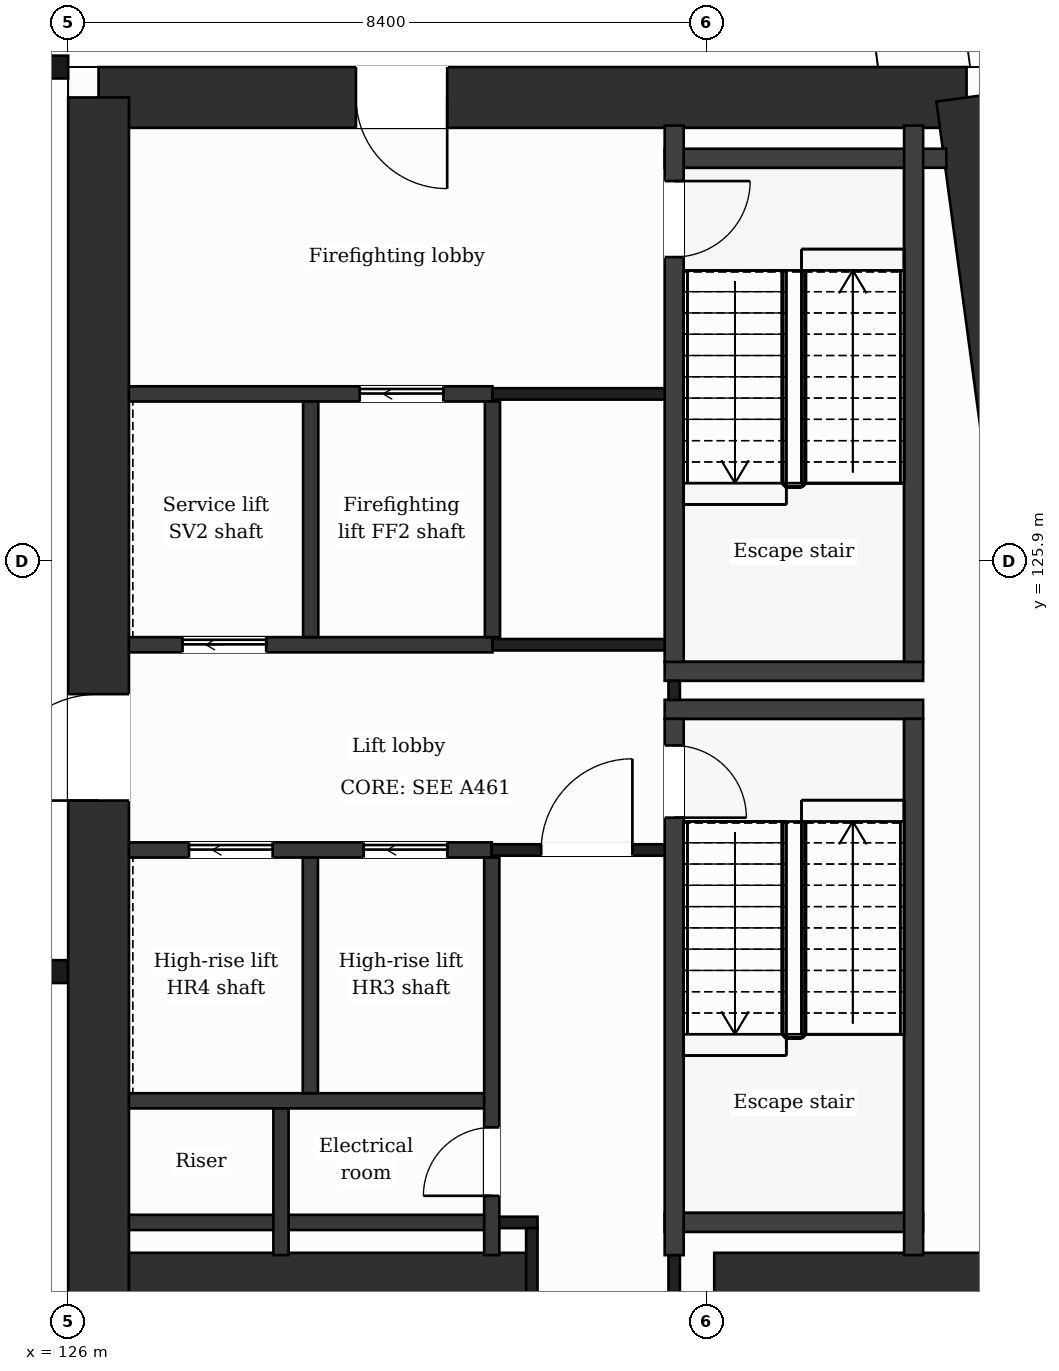
"""IFC4 building model, lengths in metres.
Left out: names, types, materials, properties, quantities, classifications, styles, units other than length and angle.
Written with IfcOpenShell. Run it as: python <this file> out.ifc"""

import sys

from ifc_helpers import new_model, si_unit, direction, frame, frame_2d, origin, place, context, subcontext, project, spatial, rectangle, extrude, element, fill, save


model = new_model("IFC4")
c1 = context("Model", 3, precision=1e-05, world=origin(), true_north=direction((0.0, 1.0)))
c2 = subcontext(c1, "Body", "Model", "MODEL_VIEW")
j1 = project(units=[si_unit("LENGTHUNIT", "METRE"), si_unit("PLANEANGLEUNIT", "RADIAN")], contexts=[c1])
p1 = place(None, origin())
s1 = spatial("IfcSite", under=j1, at=p1, CompositionType="ELEMENT")
p2 = place(p1, origin())
s2 = spatial("IfcBuilding", under=s1, at=p2, CompositionType="ELEMENT")
p3 = place(p2, frame((0.0, 0.0, 246.6)))
s3 = spatial("IfcBuildingStorey", under=s2, at=p3, CompositionType="ELEMENT", Elevation=246.6)
p4 = place(p3, frame((126.4, 132.0, 0.0), z_axis=(0.0, 0.0, 1.0), x_axis=(1.0, 0.0, 0.0)))
e1 = element("IfcWall", 1, at=p4, inside=s3, PredefinedType="SHEAR", context=c2, shape_type="SweptSolid", body=[
    extrude(rectangle(XDim=11.42, YDim=0.8, at=frame_2d((5.71, 0.0))), origin(), (0.0, 0.0, 1.0), 7.4),
])
p5 = place(p4, frame((3.386, 0.0, 0.0)))
e2 = element("IfcOpeningElement", 2, at=p5, cuts=e1, PredefinedType="OPENING", context=c2, shape_type="SweptSolid", body=[
    extrude(rectangle(XDim=1.2, YDim=2.1, at=frame_2d((0.6, 1.05))), frame((0.0, 0.41, 0.0), z_axis=(0.0, -1.0, 0.0), x_axis=(1.0, 0.0, 0.0)), (0.0, 0.0, 1.0), 0.82),
])
p6 = place(p3, frame((137.82, 132.0, 0.0), z_axis=(0.0, 0.0, 1.0), x_axis=(0.133408347329, -0.991061154956, 0.0)))
e3 = element("IfcWall", 3, at=p6, inside=s3, PredefinedType="SHEAR", context=c2, shape_type="SweptSolid", body=[
    extrude(rectangle(XDim=21.391, YDim=0.8, at=frame_2d((10.696, 0.0))), origin(), (0.0, 0.0, 1.0), 7.4),
])
p7 = place(p3, frame((126.4, 110.8, 0.0), z_axis=(0.0, 0.0, 1.0), x_axis=(0.0, 1.0, 0.0)))
e4 = element("IfcWall", 4, at=p7, inside=s3, PredefinedType="SHEAR", context=c2, shape_type="SweptSolid", body=[
    extrude(rectangle(XDim=21.2, YDim=0.8, at=frame_2d((10.6, 0.0))), origin(), (0.0, 0.0, 1.0), 7.4),
])
p8 = place(p7, frame((11.95, 0.0, 0.0)))
e5 = element("IfcOpeningElement", 5, at=p8, cuts=e4, PredefinedType="OPENING", context=c2, shape_type="SweptSolid", body=[
    extrude(rectangle(XDim=1.4, YDim=2.1, at=frame_2d((0.7, 1.05))), frame((0.0, 0.41, 0.0), z_axis=(0.0, -1.0, 0.0), x_axis=(1.0, 0.0, 0.0)), (0.0, 0.0, 1.0), 0.82),
])
p9 = place(p3, frame((126.8, 116.4, 0.0), z_axis=(0.0, 0.0, 1.0), x_axis=(1.0, 0.0, 0.0)))
e6 = element("IfcWall", 6, at=p9, inside=s3, PredefinedType="SHEAR", context=c2, shape_type="SweptSolid", body=[
    extrude(rectangle(XDim=5.3, YDim=0.8, at=frame_2d((2.65, 0.0))), origin(), (0.0, 0.0, 1.0), 7.4),
])
p10 = place(p3, frame((134.5, 116.4, 0.0), z_axis=(0.0, 0.0, 1.0), x_axis=(1.0, 0.0, 0.0)))
e7 = element("IfcWall", 7, at=p10, inside=s3, PredefinedType="SHEAR", context=c2, shape_type="SweptSolid", body=[
    extrude(rectangle(XDim=5.077, YDim=0.8, at=frame_2d((2.539, 0.0))), origin(), (0.0, 0.0, 1.0), 7.4),
])
p11 = place(p3, frame((126.8, 117.2, 0.0), z_axis=(0.0, 0.0, 1.0), x_axis=(1.0, 0.0, 0.0)))
e8 = element("IfcWall", 8, at=p11, inside=s3, PredefinedType="PARTITIONING", context=c2, shape_type="SweptSolid", body=[
    extrude(rectangle(XDim=4.773, YDim=0.2, at=frame_2d((2.386, 0.0))), origin(), (0.0, 0.0, 1.0), 6.9),
])
p12 = place(p3, frame((131.573, 117.2, 0.0), z_axis=(0.0, 0.0, 1.0), x_axis=(1.0, 0.0, 0.0)))
e9 = element("IfcWall", 9, at=p12, inside=s3, PredefinedType="PARTITIONING", context=c2, shape_type="SweptSolid", body=[
    extrude(rectangle(XDim=0.602, YDim=0.15, at=frame_2d((0.301, 0.0))), origin(), (0.0, 0.0, 1.0), 6.9),
])
p13 = place(p3, frame((133.848, 117.2, 0.0), z_axis=(0.0, 0.0, 1.0), x_axis=(1.0, 0.0, 0.0)))
e10 = element("IfcWall", 10, at=p13, inside=s3, PredefinedType="PARTITIONING", context=c2, shape_type="SweptSolid", body=[
    extrude(rectangle(XDim=3.4, YDim=0.25, at=frame_2d((1.7, 0.0))), origin(), (0.0, 0.0, 1.0), 6.9),
])
p14 = place(p3, frame((126.8, 118.8, 0.0), z_axis=(0.0, 0.0, 1.0), x_axis=(1.0, 0.0, 0.0)))
e11 = element("IfcWall", 11, at=p14, inside=s3, PredefinedType="PARTITIONING", context=c2, shape_type="SweptSolid", body=[
    extrude(rectangle(XDim=4.773, YDim=0.2, at=frame_2d((2.386, 0.0))), origin(), (0.0, 0.0, 1.0), 6.9),
])
p15 = place(p3, frame((100.8, 120.5, 0.0), z_axis=(0.0, 0.0, 1.0), x_axis=(1.0, 0.0, 0.0)))
e12 = element("IfcWall", 12, at=p15, inside=s3, PredefinedType="PARTITIONING", context=c2, shape_type="SweptSolid", body=[
    extrude(rectangle(XDim=25.2, YDim=0.3, at=frame_2d((12.6, 0.0))), origin(), (0.0, 0.0, 1.0), 1.0),
])
p16 = place(p3, frame((126.8, 122.1, 0.0), z_axis=(0.0, 0.0, 1.0), x_axis=(1.0, 0.0, 0.0)))
e13 = element("IfcWall", 13, at=p16, inside=s3, PredefinedType="PARTITIONING", context=c2, shape_type="SweptSolid", body=[
    extrude(rectangle(XDim=4.773, YDim=0.2, at=frame_2d((2.386, 0.0))), origin(), (0.0, 0.0, 1.0), 6.9),
])
p17 = place(p16, frame((3.088, 0.0, 0.0)))
e14 = element("IfcOpeningElement", 14, at=p17, cuts=e13, PredefinedType="OPENING", context=c2, shape_type="SweptSolid", body=[
    extrude(rectangle(XDim=1.1, YDim=2.1, at=frame_2d((0.55, 1.05))), frame((0.0, 0.11, 0.0), z_axis=(0.0, -1.0, 0.0), x_axis=(1.0, 0.0, 0.0)), (0.0, 0.0, 1.0), 0.22),
])
p18 = place(p16, frame((0.79, 0.0, 0.0)))
e15 = element("IfcOpeningElement", 15, at=p18, cuts=e13, PredefinedType="OPENING", context=c2, shape_type="SweptSolid", body=[
    extrude(rectangle(XDim=1.1, YDim=2.1, at=frame_2d((0.55, 1.05))), frame((0.0, 0.11, 0.0), z_axis=(0.0, -1.0, 0.0), x_axis=(1.0, 0.0, 0.0)), (0.0, 0.0, 1.0), 0.22),
])
p19 = place(p3, frame((131.573, 122.1, 0.0), z_axis=(0.0, 0.0, 1.0), x_axis=(1.0, 0.0, 0.0)))
e16 = element("IfcWall", 16, at=p19, inside=s3, PredefinedType="PARTITIONING", context=c2, shape_type="SweptSolid", body=[
    extrude(rectangle(XDim=2.4, YDim=0.15, at=frame_2d((1.2, 0.0))), origin(), (0.0, 0.0, 1.0), 6.9),
])
p20 = place(p19, frame((0.65, 0.0, 0.0)))
e17 = element("IfcOpeningElement", 17, at=p20, cuts=e16, PredefinedType="OPENING", context=c2, shape_type="SweptSolid", body=[
    extrude(rectangle(XDim=1.2, YDim=2.1, at=frame_2d((0.6, 1.05))), frame((0.0, 0.085, 0.0), z_axis=(0.0, -1.0, 0.0), x_axis=(1.0, 0.0, 0.0)), (0.0, 0.0, 1.0), 0.17),
])
for number, where, z_axis, x_axis in (
    (18, (133.848, 123.95, 0.0), (0.0, 0.0, 1.0), (1.0, 0.0, 0.0)),
    (19, (133.848, 124.45, 0.0), (0.0, 0.0, 1.0), (1.0, 0.0, 0.0)),
):
    element("IfcWall", number, at=place(p3, frame(where, z_axis=z_axis, x_axis=x_axis)), inside=s3, PredefinedType="PARTITIONING", context=c2, shape_type="SweptSolid", body=[
        extrude(rectangle(XDim=3.4, YDim=0.25, at=frame_2d((1.7, 0.0))), origin(), (0.0, 0.0, 1.0), 6.9),
    ])
p21 = place(p3, frame((126.8, 124.8, 0.0), z_axis=(0.0, 0.0, 1.0), x_axis=(1.0, 0.0, 0.0)))
e20 = element("IfcWall", 20, at=p21, inside=s3, PredefinedType="PARTITIONING", context=c2, shape_type="SweptSolid", body=[
    extrude(rectangle(XDim=4.782, YDim=0.2, at=frame_2d((2.391, 0.0))), origin(), (0.0, 0.0, 1.0), 6.9),
])
p22 = place(p21, frame((0.705, 0.0, 0.0)))
e21 = element("IfcOpeningElement", 21, at=p22, cuts=e20, PredefinedType="OPENING", context=c2, shape_type="SweptSolid", body=[
    extrude(rectangle(XDim=1.1, YDim=2.1, at=frame_2d((0.55, 1.05))), frame((0.0, 0.11, 0.0), z_axis=(0.0, -1.0, 0.0), x_axis=(1.0, 0.0, 0.0)), (0.0, 0.0, 1.0), 0.22),
])
p23 = place(p3, frame((131.582, 124.8, 0.0), z_axis=(0.0, 0.0, 1.0), x_axis=(1.0, 0.0, 0.0)))
e22 = element("IfcWall", 22, at=p23, inside=s3, PredefinedType="PARTITIONING", context=c2, shape_type="SweptSolid", body=[
    extrude(rectangle(XDim=2.516, YDim=0.15, at=frame_2d((1.258, 0.0))), origin(), (0.0, 0.0, 1.0), 6.9),
])
p24 = place(p3, frame((126.8, 128.1, 0.0), z_axis=(0.0, 0.0, 1.0), x_axis=(1.0, 0.0, 0.0)))
e23 = element("IfcWall", 23, at=p24, inside=s3, PredefinedType="PARTITIONING", context=c2, shape_type="SweptSolid", body=[
    extrude(rectangle(XDim=4.782, YDim=0.2, at=frame_2d((2.391, 0.0))), origin(), (0.0, 0.0, 1.0), 6.9),
])
p25 = place(p24, frame((3.036, 0.0, 0.0)))
e24 = element("IfcOpeningElement", 24, at=p25, cuts=e23, PredefinedType="OPENING", context=c2, shape_type="SweptSolid", body=[
    extrude(rectangle(XDim=1.1, YDim=2.1, at=frame_2d((0.55, 1.05))), frame((0.0, 0.11, 0.0), z_axis=(0.0, -1.0, 0.0), x_axis=(1.0, 0.0, 0.0)), (0.0, 0.0, 1.0), 0.22),
])
p26 = place(p3, frame((131.582, 128.1, 0.0), z_axis=(0.0, 0.0, 1.0), x_axis=(1.0, 0.0, 0.0)))
e25 = element("IfcWall", 25, at=p26, inside=s3, PredefinedType="PARTITIONING", context=c2, shape_type="SweptSolid", body=[
    extrude(rectangle(XDim=2.391, YDim=0.15, at=frame_2d((1.195, 0.0))), origin(), (0.0, 0.0, 1.0), 6.9),
])
p27 = place(p3, frame((133.848, 131.2, 0.0), z_axis=(0.0, 0.0, 1.0), x_axis=(1.0, 0.0, 0.0)))
e26 = element("IfcWall", 26, at=p27, inside=s3, PredefinedType="PARTITIONING", context=c2, shape_type="SweptSolid", body=[
    extrude(rectangle(XDim=3.706, YDim=0.25, at=frame_2d((1.853, 0.0))), origin(), (0.0, 0.0, 1.0), 6.9),
])
p28 = place(p3, frame((124.4, 132.4, 0.0), z_axis=(0.0, 0.0, 1.0), x_axis=(1.0, 0.0, 0.0)))
e27 = element("IfcWall", 27, at=p28, inside=s3, PredefinedType="PARTITIONING", context=c2, shape_type="SweptSolid", body=[
    extrude(rectangle(XDim=1.6, YDim=0.3, at=frame_2d((0.8, 0.0))), origin(), (0.0, 0.0, 1.0), 1.0),
])
p29 = place(p3, frame((128.8, 116.77, 0.0), z_axis=(0.0, 0.0, 1.0), x_axis=(0.0, 1.0, 0.0)))
e28 = element("IfcWall", 28, at=p29, inside=s3, PredefinedType="PARTITIONING", context=c2, shape_type="SweptSolid", body=[
    extrude(rectangle(XDim=1.93, YDim=0.2, at=frame_2d((0.965, 0.0))), origin(), (0.0, 0.0, 1.0), 6.9),
])
for number, where, z_axis, x_axis in (
    (29, (129.187, 118.9, 0.0), (0.0, 0.0, 1.0), (0.0, 1.0, 0.0)),
    (30, (129.191, 124.9, 0.0), (0.0, 0.0, 1.0), (0.0, 1.0, 0.0)),
):
    element("IfcWall", number, at=place(p3, frame(where, z_axis=z_axis, x_axis=x_axis)), inside=s3, PredefinedType="PARTITIONING", context=c2, shape_type="SweptSolid", body=[
        extrude(rectangle(XDim=3.1, YDim=0.2, at=frame_2d((1.55, 0.0))), origin(), (0.0, 0.0, 1.0), 6.9),
    ])
p30 = place(p3, frame((131.573, 116.77, 0.0), z_axis=(0.0, 0.0, 1.0), x_axis=(0.0, 1.0, 0.0)))
e31 = element("IfcWall", 31, at=p30, inside=s3, PredefinedType="PARTITIONING", context=c2, shape_type="SweptSolid", body=[
    extrude(rectangle(XDim=5.23, YDim=0.2, at=frame_2d((2.615, 0.0))), origin(), (0.0, 0.0, 1.0), 6.9),
])
p31 = place(p30, frame((0.78, 0.0, 0.0)))
e32 = element("IfcOpeningElement", 32, at=p31, cuts=e31, PredefinedType="OPENING", context=c2, shape_type="SweptSolid", body=[
    extrude(rectangle(XDim=0.9, YDim=2.1, at=frame_2d((0.45, 1.05))), frame((0.0, 0.11, 0.0), z_axis=(0.0, -1.0, 0.0), x_axis=(1.0, 0.0, 0.0)), (0.0, 0.0, 1.0), 0.22),
])
p32 = place(p3, frame((131.582, 124.9, 0.0), z_axis=(0.0, 0.0, 1.0), x_axis=(0.0, 1.0, 0.0)))
e33 = element("IfcWall", 33, at=p32, inside=s3, PredefinedType="PARTITIONING", context=c2, shape_type="SweptSolid", body=[
    extrude(rectangle(XDim=3.1, YDim=0.2, at=frame_2d((1.55, 0.0))), origin(), (0.0, 0.0, 1.0), 6.9),
])
p33 = place(p3, frame((132.1, 116.0, 0.0), z_axis=(0.0, 0.0, 1.0), x_axis=(0.0, 1.0, 0.0)))
e34 = element("IfcWall", 34, at=p33, inside=s3, PredefinedType="PARTITIONING", context=c2, shape_type="SweptSolid", body=[
    extrude(rectangle(XDim=1.125, YDim=0.15, at=frame_2d((0.562, 0.0))), origin(), (0.0, 0.0, 1.0), 6.9),
])
p34 = place(p3, frame((133.973, 116.0, 0.0), z_axis=(0.0, 0.0, 1.0), x_axis=(0.0, 1.0, 0.0)))
e35 = element("IfcWall", 35, at=p34, inside=s3, PredefinedType="PARTITIONING", context=c2, shape_type="SweptSolid", body=[
    extrude(rectangle(XDim=0.77, YDim=0.15, at=frame_2d((0.385, 0.0))), origin(), (0.0, 0.0, 1.0), 6.9),
])
p35 = place(p3, frame((133.973, 124.075, 0.0), z_axis=(0.0, 0.0, 1.0), x_axis=(0.0, 1.0, 0.0)))
e36 = element("IfcWall", 36, at=p35, inside=s3, PredefinedType="PARTITIONING", context=c2, shape_type="SweptSolid", body=[
    extrude(rectangle(XDim=0.25, YDim=0.15, at=frame_2d((0.125, 0.0))), origin(), (0.0, 0.0, 1.0), 6.9),
])
p36 = place(p3, frame((133.973, 116.77, 0.0), z_axis=(0.0, 0.0, 1.0), x_axis=(0.0, 1.0, 0.0)))
e37 = element("IfcWall", 37, at=p36, inside=s3, PredefinedType="PARTITIONING", context=c2, shape_type="SweptSolid", body=[
    extrude(rectangle(XDim=7.055, YDim=0.25, at=frame_2d((3.527, 0.0))), origin(), (0.0, 0.0, 1.0), 6.9),
])
p37 = place(p36, frame((5.755, 0.0, 0.0)))
e38 = element("IfcOpeningElement", 38, at=p37, cuts=e37, PredefinedType="OPENING", context=c2, shape_type="SweptSolid", body=[
    extrude(rectangle(XDim=0.95, YDim=2.1, at=frame_2d((0.475, 1.05))), frame((0.0, 0.135, 0.0), z_axis=(0.0, -1.0, 0.0), x_axis=(1.0, 0.0, 0.0)), (0.0, 0.0, 1.0), 0.27),
])
p38 = place(p3, frame((133.973, 124.575, 0.0), z_axis=(0.0, 0.0, 1.0), x_axis=(0.0, 1.0, 0.0)))
e39 = element("IfcWall", 39, at=p38, inside=s3, PredefinedType="PARTITIONING", context=c2, shape_type="SweptSolid", body=[
    extrude(rectangle(XDim=7.055, YDim=0.25, at=frame_2d((3.527, 0.0))), origin(), (0.0, 0.0, 1.0), 6.9),
])
p39 = place(p38, frame((5.325, 0.0, 0.0)))
e40 = element("IfcOpeningElement", 40, at=p39, cuts=e39, PredefinedType="OPENING", context=c2, shape_type="SweptSolid", body=[
    extrude(rectangle(XDim=1.0, YDim=2.1, at=frame_2d((0.5, 1.05))), frame((0.0, 0.135, 0.0), z_axis=(0.0, -1.0, 0.0), x_axis=(1.0, 0.0, 0.0)), (0.0, 0.0, 1.0), 0.27),
])
for number, where, z_axis, x_axis in (
    (41, (137.123, 116.77, 0.0), (0.0, 0.0, 1.0), (0.0, 1.0, 0.0)),
    (42, (137.123, 124.575, 0.0), (0.0, 0.0, 1.0), (0.0, 1.0, 0.0)),
):
    element("IfcWall", number, at=place(p3, frame(where, z_axis=z_axis, x_axis=x_axis)), inside=s3, PredefinedType="PARTITIONING", context=c2, shape_type="SweptSolid", body=[
        extrude(rectangle(XDim=7.055, YDim=0.25, at=frame_2d((3.527, 0.0))), origin(), (0.0, 0.0, 1.0), 6.9),
    ])
p40 = place(p20, origin())
e43 = element("IfcDoor", 43, at=p40, inside=s3, OperationType="SINGLE_SWING_RIGHT", PredefinedType="DOOR", context=c2, shape_type="SweptSolid", body=[
    extrude(rectangle(XDim=1.2, YDim=2.1, at=frame_2d((0.6, 1.05))), frame((0.0, 0.025, 0.0), z_axis=(0.0, -1.0, 0.0), x_axis=(1.0, 0.0, 0.0)), (0.0, 0.0, 1.0), 0.05),
])
fill(e17, e43)
p41 = place(p17, origin())
e44 = element("IfcDoor", 44, at=p41, inside=s3, OperationType="SLIDING_TO_LEFT", PredefinedType="DOOR", context=c2, shape_type="SweptSolid", body=[
    extrude(rectangle(XDim=1.1, YDim=2.1, at=frame_2d((0.55, 1.05))), frame((0.0, 0.025, 0.0), z_axis=(0.0, -1.0, 0.0), x_axis=(1.0, 0.0, 0.0)), (0.0, 0.0, 1.0), 0.05),
])
fill(e14, e44)
p42 = place(p18, origin())
e45 = element("IfcDoor", 45, at=p42, inside=s3, OperationType="SLIDING_TO_LEFT", PredefinedType="DOOR", context=c2, shape_type="SweptSolid", body=[
    extrude(rectangle(XDim=1.1, YDim=2.1, at=frame_2d((0.55, 1.05))), frame((0.0, 0.025, 0.0), z_axis=(0.0, -1.0, 0.0), x_axis=(1.0, 0.0, 0.0)), (0.0, 0.0, 1.0), 0.05),
])
fill(e15, e45)
p43 = place(p25, origin())
e46 = element("IfcDoor", 46, at=p43, inside=s3, OperationType="SLIDING_TO_LEFT", PredefinedType="DOOR", context=c2, shape_type="SweptSolid", body=[
    extrude(rectangle(XDim=1.1, YDim=2.1, at=frame_2d((0.55, 1.05))), frame((0.0, 0.025, 0.0), z_axis=(0.0, -1.0, 0.0), x_axis=(1.0, 0.0, 0.0)), (0.0, 0.0, 1.0), 0.05),
])
fill(e24, e46)
p44 = place(p22, origin())
e47 = element("IfcDoor", 47, at=p44, inside=s3, OperationType="SLIDING_TO_LEFT", PredefinedType="DOOR", context=c2, shape_type="SweptSolid", body=[
    extrude(rectangle(XDim=1.1, YDim=2.1, at=frame_2d((0.55, 1.05))), frame((0.0, 0.025, 0.0), z_axis=(0.0, -1.0, 0.0), x_axis=(1.0, 0.0, 0.0)), (0.0, 0.0, 1.0), 0.05),
])
fill(e21, e47)
p45 = place(p37, origin())
e48 = element("IfcDoor", 48, at=p45, inside=s3, OperationType="SINGLE_SWING_LEFT", PredefinedType="DOOR", context=c2, shape_type="SweptSolid", body=[
    extrude(rectangle(XDim=0.95, YDim=2.1, at=frame_2d((0.475, 1.05))), frame((0.0, 0.025, 0.0), z_axis=(0.0, -1.0, 0.0), x_axis=(1.0, 0.0, 0.0)), (0.0, 0.0, 1.0), 0.05),
])
fill(e38, e48)
p46 = place(p39, origin())
e49 = element("IfcDoor", 49, at=p46, inside=s3, OperationType="SINGLE_SWING_RIGHT", PredefinedType="DOOR", context=c2, shape_type="SweptSolid", body=[
    extrude(rectangle(XDim=1.0, YDim=2.1, at=frame_2d((0.5, 1.05))), frame((0.0, 0.025, 0.0), z_axis=(0.0, -1.0, 0.0), x_axis=(1.0, 0.0, 0.0)), (0.0, 0.0, 1.0), 0.05),
])
fill(e40, e49)
p47 = place(p31, origin())
e50 = element("IfcDoor", 50, at=p47, inside=s3, OperationType="SINGLE_SWING_LEFT", PredefinedType="DOOR", context=c2, shape_type="SweptSolid", body=[
    extrude(rectangle(XDim=0.9, YDim=2.1, at=frame_2d((0.45, 1.05))), frame((0.0, 0.025, 0.0), z_axis=(0.0, -1.0, 0.0), x_axis=(1.0, 0.0, 0.0)), (0.0, 0.0, 1.0), 0.05),
])
fill(e32, e50)
p48 = place(p5, origin())
e51 = element("IfcDoor", 51, at=p48, inside=s3, OperationType="SINGLE_SWING_RIGHT", PredefinedType="DOOR", context=c2, shape_type="SweptSolid", body=[
    extrude(rectangle(XDim=1.2, YDim=2.1, at=frame_2d((0.6, 1.05))), frame((0.0, 0.025, 0.0), z_axis=(0.0, -1.0, 0.0), x_axis=(1.0, 0.0, 0.0)), (0.0, 0.0, 1.0), 0.05),
])
fill(e2, e51)
p49 = place(p8, origin())
e52 = element("IfcDoor", 52, at=p49, inside=s3, OperationType="SINGLE_SWING_LEFT", PredefinedType="DOOR", context=c2, shape_type="SweptSolid", body=[
    extrude(rectangle(XDim=1.4, YDim=2.1, at=frame_2d((0.7, 1.05))), frame((0.0, 0.025, 0.0), z_axis=(0.0, -1.0, 0.0), x_axis=(1.0, 0.0, 0.0)), (0.0, 0.0, 1.0), 0.05),
])
fill(e5, e52)
save(model, sys.argv[1])
